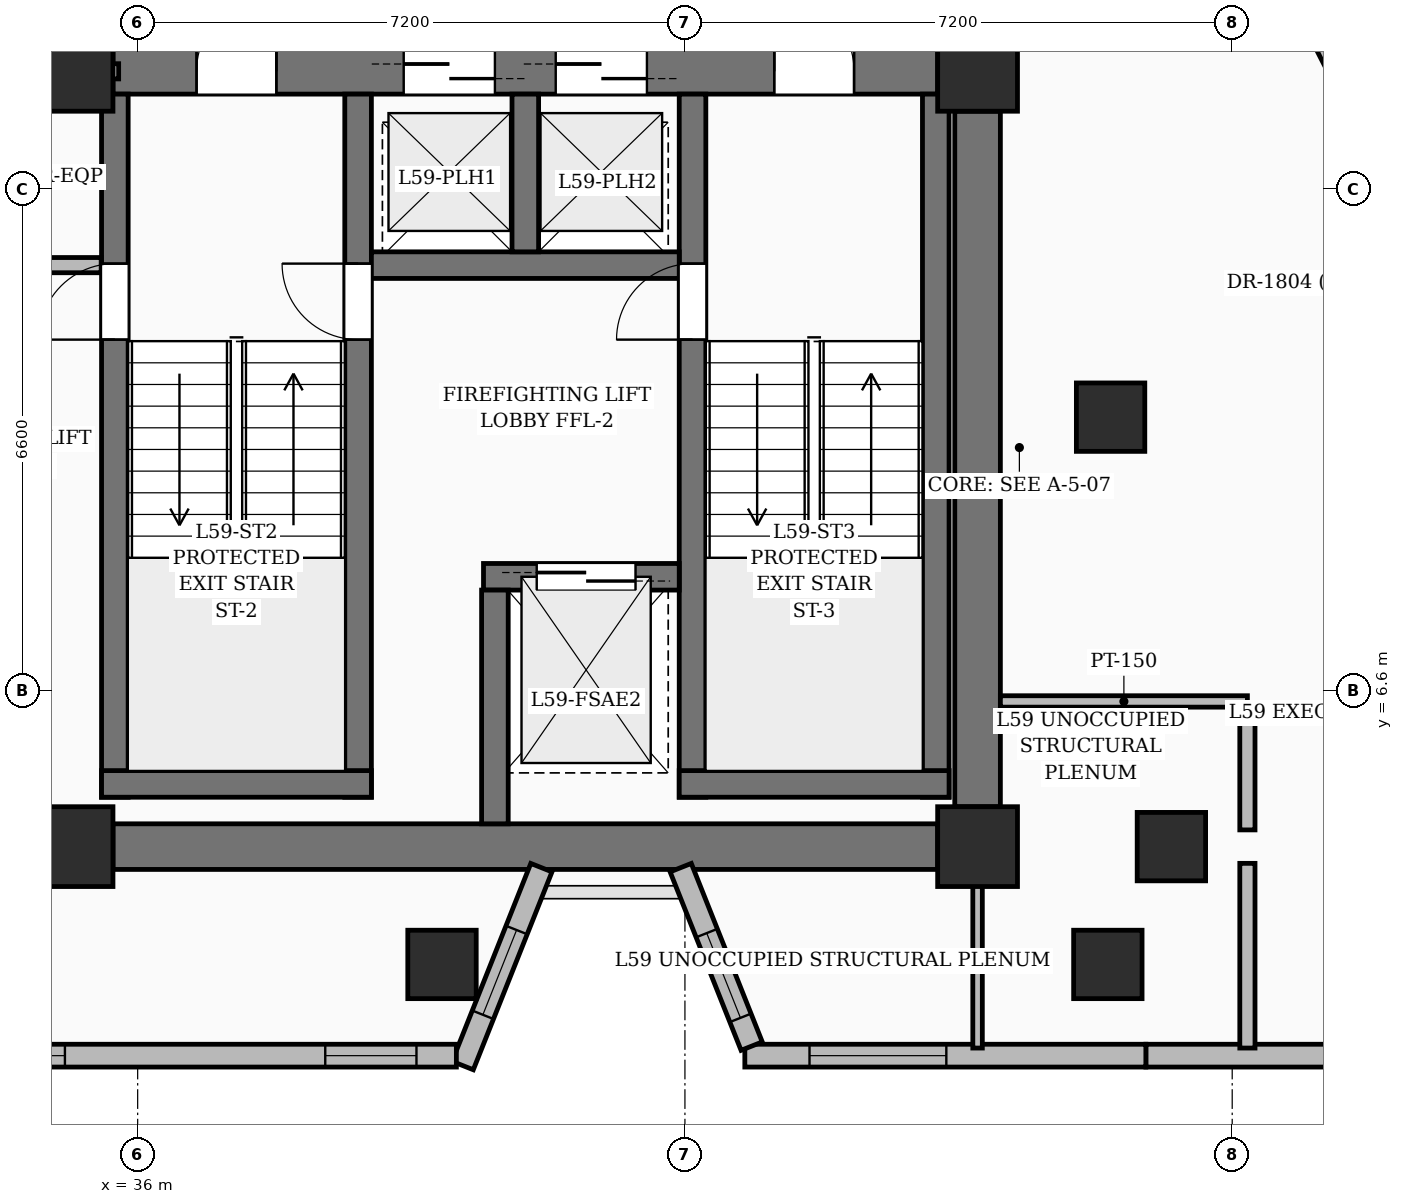
"""IFC4 building model, lengths in metres.
Left out: names, types, materials, properties, quantities, classifications, styles, units other than length and angle.
Written with IfcOpenShell. Run it as: python <this file> out.ifc"""

import sys

from ifc_helpers import new_model, si_unit, direction, frame, frame_2d, origin, origin_2d, place, context, subcontext, project, spatial, rectangle, extrude, element, fill, save


model = new_model("IFC4")
c1 = context("Model", 3, precision=1e-05, world=origin(), true_north=direction((0.0, 1.0)))
c2 = subcontext(c1, "Body", "Model", "MODEL_VIEW")
j1 = project(units=[si_unit("LENGTHUNIT", "METRE"), si_unit("PLANEANGLEUNIT", "RADIAN")], contexts=[c1])
p1 = place(None, origin())
s1 = spatial("IfcSite", under=j1, at=p1, CompositionType="ELEMENT")
p2 = place(p1, origin())
s2 = spatial("IfcBuilding", under=s1, at=p2, CompositionType="ELEMENT")
p3 = place(p2, frame((0.0, 0.0, 229.5)))
s3 = spatial("IfcBuildingStorey", under=s2, at=p3, CompositionType="ELEMENT", Elevation=229.5)
for number, where, z_axis, x_axis in (
    (1, (35.15, 4.55, 0.0), (0.0, 0.0, 1.0), (1.0, 0.0, 0.0)),
    (2, (47.05, 4.55, 0.0), (0.0, 0.0, 1.0), (1.0, 0.0, 0.0)),
    (3, (35.15, 14.75, 0.0), (0.0, 0.0, 1.0), (1.0, 0.0, 0.0)),
    (4, (47.05, 14.75, 0.0), (0.0, 0.0, 1.0), (1.0, 0.0, 0.0)),
):
    element("IfcColumn", number, at=place(p3, frame(where, z_axis=z_axis, x_axis=x_axis)), inside=s3, PredefinedType="COLUMN", context=c2, shape_type="SweptSolid", body=[
        extrude(rectangle(XDim=1.05, YDim=1.05, at=origin_2d()), origin(), (0.0, 0.0, 1.0), 3.75),
    ])
for number, where, z_axis, x_axis in (
    (5, (49.6, 4.55, 0.0), (0.0, 0.0, 1.0), (1.0, 0.0, 0.0)),
    (6, (48.8, 10.2, 0.0), (0.0, 0.0, 1.0), (1.0, 0.0, 0.0)),
):
    element("IfcColumn", number, at=place(p3, frame(where, z_axis=z_axis, x_axis=x_axis)), inside=s3, PredefinedType="COLUMN", context=c2, shape_type="SweptSolid", body=[
        extrude(rectangle(XDim=0.9, YDim=0.9, at=origin_2d()), origin(), (0.0, 0.0, 1.0), 3.75),
    ])
p4 = place(p3, frame((35.675, 4.55, 0.0), z_axis=(0.0, 0.0, 1.0), x_axis=(1.0, 0.0, 0.0)))
e7 = element("IfcWall", 7, at=p4, inside=s3, PredefinedType="SHEAR", context=c2, shape_type="SweptSolid", body=[
    extrude(rectangle(XDim=10.85, YDim=0.6, at=frame_2d((5.425, 0.0))), origin(), (0.0, 0.0, 1.0), 3.75),
])
p5 = place(p3, frame((35.675, 14.75, 0.0), z_axis=(0.0, 0.0, 1.0), x_axis=(1.0, 0.0, 0.0)))
e8 = element("IfcWall", 8, at=p5, inside=s3, PredefinedType="SHEAR", context=c2, shape_type="SweptSolid", body=[
    extrude(rectangle(XDim=10.85, YDim=0.6, at=frame_2d((5.425, 0.0))), origin(), (0.0, 0.0, 1.0), 3.75),
])
p6 = place(p5, frame((1.1, 0.0, 0.0)))
e9 = element("IfcOpeningElement", 9, at=p6, cuts=e8, PredefinedType="OPENING", context=c2, shape_type="SweptSolid", body=[
    extrude(rectangle(XDim=1.05, YDim=2.15, at=frame_2d((0.525, 1.075))), frame((0.0, 0.31, 0.0), z_axis=(0.0, -1.0, 0.0), x_axis=(1.0, 0.0, 0.0)), (0.0, 0.0, 1.0), 0.62),
])
p7 = place(p5, frame((8.7, 0.0, 0.0)))
e10 = element("IfcOpeningElement", 10, at=p7, cuts=e8, PredefinedType="OPENING", context=c2, shape_type="SweptSolid", body=[
    extrude(rectangle(XDim=1.05, YDim=2.15, at=frame_2d((0.525, 1.075))), frame((0.0, 0.31, 0.0), z_axis=(0.0, -1.0, 0.0), x_axis=(1.0, 0.0, 0.0)), (0.0, 0.0, 1.0), 0.62),
])
p8 = place(p5, frame((3.825, 0.0, 0.0)))
e11 = element("IfcOpeningElement", 11, at=p8, cuts=e8, PredefinedType="OPENING", context=c2, shape_type="SweptSolid", body=[
    extrude(rectangle(XDim=1.2, YDim=2.2, at=frame_2d((0.6, 1.1))), frame((0.0, 0.31, 0.0), z_axis=(0.0, -1.0, 0.0), x_axis=(1.0, 0.0, 0.0)), (0.0, 0.0, 1.0), 0.62),
])
p9 = place(p5, frame((5.825, 0.0, 0.0)))
e12 = element("IfcOpeningElement", 12, at=p9, cuts=e8, PredefinedType="OPENING", context=c2, shape_type="SweptSolid", body=[
    extrude(rectangle(XDim=1.2, YDim=2.2, at=frame_2d((0.6, 1.1))), frame((0.0, 0.31, 0.0), z_axis=(0.0, -1.0, 0.0), x_axis=(1.0, 0.0, 0.0)), (0.0, 0.0, 1.0), 0.62),
])
p10 = place(p3, frame((47.05, 5.075, 0.0), z_axis=(0.0, 0.0, 1.0), x_axis=(0.0, 1.0, 0.0)))
e13 = element("IfcWall", 13, at=p10, inside=s3, PredefinedType="SHEAR", context=c2, shape_type="SweptSolid", body=[
    extrude(rectangle(XDim=9.15, YDim=0.6, at=frame_2d((4.575, 0.0))), origin(), (0.0, 0.0, 1.0), 3.75),
])
p11 = place(p3, frame((35.7, 5.2, 0.0), z_axis=(0.0, 0.0, 1.0), x_axis=(0.0, 1.0, 0.0)))
e14 = element("IfcWall", 14, at=p11, inside=s3, PredefinedType="SOLIDWALL", context=c2, shape_type="SweptSolid", body=[
    extrude(rectangle(XDim=9.25, YDim=0.35, at=frame_2d((4.625, 0.0))), origin(), (0.0, 0.0, 1.0), 3.75),
])
p12 = place(p11, frame((6.02, 0.0, 0.0)))
e15 = element("IfcOpeningElement", 15, at=p12, cuts=e14, PredefinedType="OPENING", context=c2, shape_type="SweptSolid", body=[
    extrude(rectangle(XDim=1.0, YDim=2.15, at=frame_2d((0.5, 1.075))), frame((0.0, 0.185, 0.0), z_axis=(0.0, -1.0, 0.0), x_axis=(1.0, 0.0, 0.0)), (0.0, 0.0, 1.0), 0.37),
])
p13 = place(p3, frame((38.9, 5.2, 0.0), z_axis=(0.0, 0.0, 1.0), x_axis=(0.0, 1.0, 0.0)))
e16 = element("IfcWall", 16, at=p13, inside=s3, PredefinedType="SOLIDWALL", context=c2, shape_type="SweptSolid", body=[
    extrude(rectangle(XDim=9.25, YDim=0.35, at=frame_2d((4.625, 0.0))), origin(), (0.0, 0.0, 1.0), 3.75),
])
p14 = place(p13, frame((6.02, 0.0, 0.0)))
e17 = element("IfcOpeningElement", 17, at=p14, cuts=e16, PredefinedType="OPENING", context=c2, shape_type="SweptSolid", body=[
    extrude(rectangle(XDim=1.0, YDim=2.15, at=frame_2d((0.5, 1.075))), frame((0.0, 0.185, 0.0), z_axis=(0.0, -1.0, 0.0), x_axis=(1.0, 0.0, 0.0)), (0.0, 0.0, 1.0), 0.37),
])
p15 = place(p3, frame((35.525, 5.375, 0.0), z_axis=(0.0, 0.0, 1.0), x_axis=(1.0, 0.0, 0.0)))
e18 = element("IfcWall", 18, at=p15, inside=s3, PredefinedType="SOLIDWALL", context=c2, shape_type="SweptSolid", body=[
    extrude(rectangle(XDim=3.55, YDim=0.35, at=frame_2d((1.775, 0.0))), origin(), (0.0, 0.0, 1.0), 3.75),
])
p16 = place(p3, frame((43.3, 5.2, 0.0), z_axis=(0.0, 0.0, 1.0), x_axis=(0.0, 1.0, 0.0)))
e19 = element("IfcWall", 19, at=p16, inside=s3, PredefinedType="SOLIDWALL", context=c2, shape_type="SweptSolid", body=[
    extrude(rectangle(XDim=9.25, YDim=0.35, at=frame_2d((4.625, 0.0))), origin(), (0.0, 0.0, 1.0), 3.75),
])
p17 = place(p16, frame((6.02, 0.0, 0.0)))
e20 = element("IfcOpeningElement", 20, at=p17, cuts=e19, PredefinedType="OPENING", context=c2, shape_type="SweptSolid", body=[
    extrude(rectangle(XDim=1.0, YDim=2.15, at=frame_2d((0.5, 1.075))), frame((0.0, 0.185, 0.0), z_axis=(0.0, -1.0, 0.0), x_axis=(1.0, 0.0, 0.0)), (0.0, 0.0, 1.0), 0.37),
])
p18 = place(p3, frame((46.5, 5.2, 0.0), z_axis=(0.0, 0.0, 1.0), x_axis=(0.0, 1.0, 0.0)))
e21 = element("IfcWall", 21, at=p18, inside=s3, PredefinedType="SOLIDWALL", context=c2, shape_type="SweptSolid", body=[
    extrude(rectangle(XDim=9.25, YDim=0.35, at=frame_2d((4.625, 0.0))), origin(), (0.0, 0.0, 1.0), 3.75),
])
p19 = place(p3, frame((43.125, 5.375, 0.0), z_axis=(0.0, 0.0, 1.0), x_axis=(1.0, 0.0, 0.0)))
e22 = element("IfcWall", 22, at=p19, inside=s3, PredefinedType="SOLIDWALL", context=c2, shape_type="SweptSolid", body=[
    extrude(rectangle(XDim=3.55, YDim=0.35, at=frame_2d((1.775, 0.0))), origin(), (0.0, 0.0, 1.0), 3.75),
])
p20 = place(p3, frame((40.55, 8.1, 0.0), z_axis=(0.0, 0.0, 1.0), x_axis=(1.0, 0.0, 0.0)))
e23 = element("IfcWall", 23, at=p20, inside=s3, PredefinedType="SOLIDWALL", context=c2, shape_type="SweptSolid", body=[
    extrude(rectangle(XDim=2.575, YDim=0.35, at=frame_2d((1.288, 0.0))), origin(), (0.0, 0.0, 1.0), 3.75),
])
p21 = place(p20, frame((0.7, 0.0, 0.0)))
e24 = element("IfcOpeningElement", 24, at=p21, cuts=e23, PredefinedType="OPENING", context=c2, shape_type="SweptSolid", body=[
    extrude(rectangle(XDim=1.3, YDim=2.25, at=frame_2d((0.65, 1.125))), frame((0.0, 0.185, 0.0), z_axis=(0.0, -1.0, 0.0), x_axis=(1.0, 0.0, 0.0)), (0.0, 0.0, 1.0), 0.37),
])
p22 = place(p3, frame((40.7, 4.85, 0.0), z_axis=(0.0, 0.0, 1.0), x_axis=(0.0, 1.0, 0.0)))
e25 = element("IfcWall", 25, at=p22, inside=s3, PredefinedType="SOLIDWALL", context=c2, shape_type="SweptSolid", body=[
    extrude(rectangle(XDim=3.075, YDim=0.35, at=frame_2d((1.538, 0.0))), origin(), (0.0, 0.0, 1.0), 3.75),
])
p23 = place(p3, frame((39.075, 12.2, 0.0), z_axis=(0.0, 0.0, 1.0), x_axis=(1.0, 0.0, 0.0)))
e26 = element("IfcWall", 26, at=p23, inside=s3, PredefinedType="SOLIDWALL", context=c2, shape_type="SweptSolid", body=[
    extrude(rectangle(XDim=4.05, YDim=0.35, at=frame_2d((2.025, 0.0))), origin(), (0.0, 0.0, 1.0), 3.75),
])
p24 = place(p3, frame((41.1, 12.375, 0.0), z_axis=(0.0, 0.0, 1.0), x_axis=(0.0, 1.0, 0.0)))
e27 = element("IfcWall", 27, at=p24, inside=s3, PredefinedType="SOLIDWALL", context=c2, shape_type="SweptSolid", body=[
    extrude(rectangle(XDim=2.075, YDim=0.35, at=frame_2d((1.038, 0.0))), origin(), (0.0, 0.0, 1.0), 3.75),
])
for number, where, z_axis, x_axis in (
    (28, (40.004, 3.0, 0.0), (0.0, 0.0, 1.0), (1.0, 0.0, 0.0)),
    (29, (48.764, 3.0, 0.0), (0.0, 0.0, 1.0), (1.0, 0.0, 0.0)),
):
    element("IfcColumn", number, at=place(p3, frame(where, z_axis=z_axis, x_axis=x_axis)), inside=s3, PredefinedType="COLUMN", context=c2, shape_type="SweptSolid", body=[
        extrude(rectangle(XDim=0.9, YDim=0.9, at=origin_2d()), origin(), (0.0, 0.0, 1.0), 3.75),
    ])
p25 = place(p3, frame((50.331, 17.684, 0.0), z_axis=(0.0, 0.0, 1.0), x_axis=(0.452886204096, -0.891568329484, 0.0)))
e30 = element("IfcWall", 30, at=p25, inside=s3, PredefinedType="SOLIDWALL", context=c2, shape_type="SweptSolid", body=[
    extrude(rectangle(XDim=6.978, YDim=0.3, at=frame_2d((3.489, 0.0))), origin(), (0.0, 0.0, 1.0), 3.5),
])
p26 = place(p25, frame((4.681, 0.0, 0.0)))
e31 = element("IfcOpeningElement", 31, at=p26, cuts=e30, PredefinedType="OPENING", context=c2, shape_type="SweptSolid", body=[
    extrude(rectangle(XDim=1.0, YDim=2.2, at=frame_2d((0.5, 1.1))), frame((0.0, 0.16, 0.0), z_axis=(0.0, -1.0, 0.0), x_axis=(1.0, 0.0, 0.0)), (0.0, 0.0, 1.0), 0.32),
])
p27 = place(p3, frame((53.975, 1.8, 0.0), z_axis=(0.0, 0.0, 1.0), x_axis=(-1.0, 0.0, 0.0)))
e32 = element("IfcWall", 32, at=p27, inside=s3, PredefinedType="SOLIDWALL", context=c2, shape_type="SweptSolid", body=[
    extrude(rectangle(XDim=4.711, YDim=0.3, at=frame_2d((2.355, 0.0))), origin(), (0.0, 0.0, 1.0), 3.5),
])
p28 = place(p3, frame((49.264, 1.8, 0.0), z_axis=(0.0, 0.0, 1.0), x_axis=(-1.0, 0.0, 0.0)))
e33 = element("IfcWall", 33, at=p28, inside=s3, PredefinedType="SOLIDWALL", context=c2, shape_type="SweptSolid", body=[
    extrude(rectangle(XDim=5.276, YDim=0.3, at=frame_2d((2.638, 0.0))), origin(), (0.0, 0.0, 1.0), 3.5),
])
p29 = place(p28, frame((2.625, 0.0, 0.6)))
e34 = element("IfcOpeningElement", 34, at=p29, cuts=e33, PredefinedType="OPENING", context=c2, shape_type="SweptSolid", body=[
    extrude(rectangle(XDim=1.8, YDim=2.1, at=frame_2d((0.9, 1.05))), frame((0.0, 0.16, 0.0), z_axis=(0.0, -1.0, 0.0), x_axis=(1.0, 0.0, 0.0)), (0.0, 0.0, 1.0), 0.32),
])
p30 = place(p3, frame((44.078, 1.925, 0.0), z_axis=(0.0, 0.0, 1.0), x_axis=(-0.369540985735, 0.929214431583, 0.0)))
e35 = element("IfcWall", 35, at=p30, inside=s3, PredefinedType="SOLIDWALL", context=c2, shape_type="SweptSolid", body=[
    extrude(rectangle(XDim=2.527, YDim=0.3, at=frame_2d((1.264, 0.0))), origin(), (0.0, 0.0, 1.0), 2.825),
])
p31 = place(p30, frame((0.4, 0.0, 0.8)))
e36 = element("IfcOpeningElement", 36, at=p31, cuts=e35, PredefinedType="OPENING", context=c2, shape_type="SweptSolid", body=[
    extrude(rectangle(XDim=1.2, YDim=1.8, at=frame_2d((0.6, 0.9))), frame((0.0, 0.16, 0.0), z_axis=(0.0, -1.0, 0.0), x_axis=(1.0, 0.0, 0.0)), (0.0, 0.0, 1.0), 0.32),
])
p32 = place(p3, frame((41.312, 4.273, 0.0), z_axis=(0.0, 0.0, 1.0), x_axis=(-0.369466825356, -0.929243921132, 0.0)))
e37 = element("IfcWall", 37, at=p32, inside=s3, PredefinedType="SOLIDWALL", context=c2, shape_type="SweptSolid", body=[
    extrude(rectangle(XDim=2.802, YDim=0.3, at=frame_2d((1.401, 0.0))), origin(), (0.0, 0.0, 1.0), 2.825),
])
p33 = place(p32, frame((0.883, 0.0, 0.8)))
e38 = element("IfcOpeningElement", 38, at=p33, cuts=e37, PredefinedType="OPENING", context=c2, shape_type="SweptSolid", body=[
    extrude(rectangle(XDim=1.2, YDim=1.8, at=frame_2d((0.6, 0.9))), frame((0.0, 0.16, 0.0), z_axis=(0.0, -1.0, 0.0), x_axis=(1.0, 0.0, 0.0)), (0.0, 0.0, 1.0), 0.32),
])
p34 = place(p3, frame((40.193, 1.8, 0.0), z_axis=(0.0, 0.0, 1.0), x_axis=(-1.0, 0.0, 0.0)))
e39 = element("IfcWall", 39, at=p34, inside=s3, PredefinedType="SOLIDWALL", context=c2, shape_type="SweptSolid", body=[
    extrude(rectangle(XDim=7.061, YDim=0.3, at=frame_2d((3.531, 0.0))), origin(), (0.0, 0.0, 1.0), 3.5),
])
p35 = place(p34, frame((5.15, 0.0, 0.8)))
e40 = element("IfcOpeningElement", 40, at=p35, cuts=e39, PredefinedType="OPENING", context=c2, shape_type="SweptSolid", body=[
    extrude(rectangle(XDim=1.2, YDim=1.8, at=frame_2d((0.6, 0.9))), frame((0.0, 0.16, 0.0), z_axis=(0.0, -1.0, 0.0), x_axis=(1.0, 0.0, 0.0)), (0.0, 0.0, 1.0), 0.32),
])
p36 = place(p34, frame((0.525, 0.0, 0.8)))
e41 = element("IfcOpeningElement", 41, at=p36, cuts=e39, PredefinedType="OPENING", context=c2, shape_type="SweptSolid", body=[
    extrude(rectangle(XDim=1.2, YDim=1.8, at=frame_2d((0.6, 0.9))), frame((0.0, 0.16, 0.0), z_axis=(0.0, -1.0, 0.0), x_axis=(1.0, 0.0, 0.0)), (0.0, 0.0, 1.0), 0.32),
])
p37 = place(p3, frame((34.72, 14.75, 0.0), z_axis=(0.0, 0.0, 1.0), x_axis=(1.0, 0.0, 0.0)))
e42 = element("IfcWall", 42, at=p37, inside=s3, PredefinedType="PARTITIONING", context=c2, shape_type="SweptSolid", body=[
    extrude(rectangle(XDim=1.03, YDim=0.2, at=frame_2d((0.515, 0.0))), origin(), (0.0, 0.0, 1.0), 2.685),
])
p38 = place(p3, frame((31.48, 12.2, 0.0), z_axis=(0.0, 0.0, 1.0), x_axis=(1.0, 0.0, 0.0)))
e43 = element("IfcWall", 43, at=p38, inside=s3, PredefinedType="PARTITIONING", context=c2, shape_type="SweptSolid", body=[
    extrude(rectangle(XDim=4.04, YDim=0.2, at=frame_2d((2.02, 0.0))), origin(), (0.0, 0.0, 1.0), 3.5),
])
p39 = place(p38, frame((1.545, 0.0, 0.0)))
e44 = element("IfcOpeningElement", 44, at=p39, cuts=e43, PredefinedType="OPENING", context=c2, shape_type="SweptSolid", body=[
    extrude(rectangle(XDim=0.95, YDim=2.15, at=frame_2d((0.475, 1.075))), frame((0.0, 0.11, 0.0), z_axis=(0.0, -1.0, 0.0), x_axis=(1.0, 0.0, 0.0)), (0.0, 0.0, 1.0), 0.22),
])
p40 = place(p3, frame((47.05, 4.25, 0.0), z_axis=(0.0, 0.0, 1.0), x_axis=(0.0, -1.0, 0.0)))
e45 = element("IfcWall", 45, at=p40, inside=s3, PredefinedType="PARTITIONING", context=c2, shape_type="SweptSolid", body=[
    extrude(rectangle(XDim=2.35, YDim=0.125, at=frame_2d((1.175, 0.0))), origin(), (0.0, 0.0, 1.0), 2.82),
])
p41 = place(p3, frame((50.6, 6.46, 0.0), z_axis=(0.0, 0.0, 1.0), x_axis=(-1.0, 0.0, 0.0)))
e46 = element("IfcWall", 46, at=p41, inside=s3, PredefinedType="PARTITIONING", context=c2, shape_type="SweptSolid", body=[
    extrude(rectangle(XDim=3.25, YDim=0.15, at=frame_2d((1.625, 0.0))), origin(), (0.0, 0.0, 1.0), 2.685),
])
p42 = place(p3, frame((50.6, 1.9, 0.0), z_axis=(0.0, 0.0, 1.0), x_axis=(0.0, 1.0, 0.0)))
e47 = element("IfcWall", 47, at=p42, inside=s3, PredefinedType="PARTITIONING", context=c2, shape_type="SweptSolid", body=[
    extrude(rectangle(XDim=2.43, YDim=0.2, at=frame_2d((1.215, 0.0))), origin(), (0.0, 0.0, 1.0), 3.5),
])
p43 = place(p3, frame((50.6, 4.77, 0.0), z_axis=(0.0, 0.0, 1.0), x_axis=(0.0, 1.0, 0.0)))
e48 = element("IfcWall", 48, at=p43, inside=s3, PredefinedType="PARTITIONING", context=c2, shape_type="SweptSolid", body=[
    extrude(rectangle(XDim=1.63, YDim=0.2, at=frame_2d((0.815, 0.0))), origin(), (0.0, 0.0, 1.0), 2.82),
])
p44 = place(p29, origin())
e49 = element("IfcWindow", 49, at=p44, inside=s3, PartitioningType="SINGLE_PANEL", PredefinedType="WINDOW", context=c2, shape_type="SweptSolid", body=[
    extrude(rectangle(XDim=1.8, YDim=2.1, at=frame_2d((0.9, 1.05))), frame((0.0, 0.03, 0.0), z_axis=(0.0, -1.0, 0.0), x_axis=(1.0, 0.0, 0.0)), (0.0, 0.0, 1.0), 0.06),
])
fill(e34, e49)
p45 = place(p31, origin())
e50 = element("IfcWindow", 50, at=p45, inside=s3, PartitioningType="SINGLE_PANEL", PredefinedType="WINDOW", context=c2, shape_type="SweptSolid", body=[
    extrude(rectangle(XDim=1.2, YDim=1.8, at=frame_2d((0.6, 0.9))), frame((0.0, 0.03, 0.0), z_axis=(0.0, -1.0, 0.0), x_axis=(1.0, 0.0, 0.0)), (0.0, 0.0, 1.0), 0.06),
])
fill(e36, e50)
p46 = place(p33, origin())
e51 = element("IfcWindow", 51, at=p46, inside=s3, PartitioningType="SINGLE_PANEL", PredefinedType="WINDOW", context=c2, shape_type="SweptSolid", body=[
    extrude(rectangle(XDim=1.2, YDim=1.8, at=frame_2d((0.6, 0.9))), frame((0.0, 0.03, 0.0), z_axis=(0.0, -1.0, 0.0), x_axis=(1.0, 0.0, 0.0)), (0.0, 0.0, 1.0), 0.06),
])
fill(e38, e51)
p47 = place(p35, origin())
e52 = element("IfcWindow", 52, at=p47, inside=s3, PartitioningType="SINGLE_PANEL", PredefinedType="WINDOW", context=c2, shape_type="SweptSolid", body=[
    extrude(rectangle(XDim=1.2, YDim=1.8, at=frame_2d((0.6, 0.9))), frame((0.0, 0.03, 0.0), z_axis=(0.0, -1.0, 0.0), x_axis=(1.0, 0.0, 0.0)), (0.0, 0.0, 1.0), 0.06),
])
fill(e40, e52)
p48 = place(p36, origin())
e53 = element("IfcWindow", 53, at=p48, inside=s3, PartitioningType="SINGLE_PANEL", PredefinedType="WINDOW", context=c2, shape_type="SweptSolid", body=[
    extrude(rectangle(XDim=1.2, YDim=1.8, at=frame_2d((0.6, 0.9))), frame((0.0, 0.03, 0.0), z_axis=(0.0, -1.0, 0.0), x_axis=(1.0, 0.0, 0.0)), (0.0, 0.0, 1.0), 0.06),
])
fill(e41, e53)
p49 = place(p6, origin())
e54 = element("IfcDoor", 54, at=p49, inside=s3, OperationType="SINGLE_SWING_RIGHT", PredefinedType="DOOR", context=c2, shape_type="SweptSolid", body=[
    extrude(rectangle(XDim=1.05, YDim=2.15, at=frame_2d((0.525, 1.075))), frame((0.0, 0.025, 0.0), z_axis=(0.0, -1.0, 0.0), x_axis=(1.0, 0.0, 0.0)), (0.0, 0.0, 1.0), 0.05),
])
fill(e9, e54)
p50 = place(p7, origin())
e55 = element("IfcDoor", 55, at=p50, inside=s3, OperationType="SINGLE_SWING_LEFT", PredefinedType="DOOR", context=c2, shape_type="SweptSolid", body=[
    extrude(rectangle(XDim=1.05, YDim=2.15, at=frame_2d((0.525, 1.075))), frame((0.0, 0.025, 0.0), z_axis=(0.0, -1.0, 0.0), x_axis=(1.0, 0.0, 0.0)), (0.0, 0.0, 1.0), 0.05),
])
fill(e10, e55)
p51 = place(p12, origin())
e56 = element("IfcDoor", 56, at=p51, inside=s3, OperationType="SINGLE_SWING_LEFT", PredefinedType="DOOR", context=c2, shape_type="SweptSolid", body=[
    extrude(rectangle(XDim=1.0, YDim=2.15, at=frame_2d((0.5, 1.075))), frame((0.0, 0.025, 0.0), z_axis=(0.0, -1.0, 0.0), x_axis=(1.0, 0.0, 0.0)), (0.0, 0.0, 1.0), 0.05),
])
fill(e15, e56)
p52 = place(p14, origin())
e57 = element("IfcDoor", 57, at=p52, inside=s3, OperationType="SINGLE_SWING_RIGHT", PredefinedType="DOOR", context=c2, shape_type="SweptSolid", body=[
    extrude(rectangle(XDim=1.0, YDim=2.15, at=frame_2d((0.5, 1.075))), frame((0.0, 0.025, 0.0), z_axis=(0.0, -1.0, 0.0), x_axis=(1.0, 0.0, 0.0)), (0.0, 0.0, 1.0), 0.05),
])
fill(e17, e57)
p53 = place(p17, origin())
e58 = element("IfcDoor", 58, at=p53, inside=s3, OperationType="SINGLE_SWING_LEFT", PredefinedType="DOOR", context=c2, shape_type="SweptSolid", body=[
    extrude(rectangle(XDim=1.0, YDim=2.15, at=frame_2d((0.5, 1.075))), frame((0.0, 0.025, 0.0), z_axis=(0.0, -1.0, 0.0), x_axis=(1.0, 0.0, 0.0)), (0.0, 0.0, 1.0), 0.05),
])
fill(e20, e58)
p54 = place(p21, origin())
e59 = element("IfcDoor", 59, at=p54, inside=s3, OperationType="DOUBLE_DOOR_SLIDING", PredefinedType="DOOR", context=c2, shape_type="SweptSolid", body=[
    extrude(rectangle(XDim=1.3, YDim=2.25, at=frame_2d((0.65, 1.125))), frame((0.0, 0.025, 0.0), z_axis=(0.0, -1.0, 0.0), x_axis=(1.0, 0.0, 0.0)), (0.0, 0.0, 1.0), 0.05),
])
fill(e24, e59)
p55 = place(p8, origin())
e60 = element("IfcDoor", 60, at=p55, inside=s3, OperationType="DOUBLE_DOOR_SLIDING", PredefinedType="DOOR", context=c2, shape_type="SweptSolid", body=[
    extrude(rectangle(XDim=1.2, YDim=2.2, at=frame_2d((0.6, 1.1))), frame((0.0, 0.025, 0.0), z_axis=(0.0, -1.0, 0.0), x_axis=(1.0, 0.0, 0.0)), (0.0, 0.0, 1.0), 0.05),
])
fill(e11, e60)
p56 = place(p9, origin())
e61 = element("IfcDoor", 61, at=p56, inside=s3, OperationType="DOUBLE_DOOR_SLIDING", PredefinedType="DOOR", context=c2, shape_type="SweptSolid", body=[
    extrude(rectangle(XDim=1.2, YDim=2.2, at=frame_2d((0.6, 1.1))), frame((0.0, 0.025, 0.0), z_axis=(0.0, -1.0, 0.0), x_axis=(1.0, 0.0, 0.0)), (0.0, 0.0, 1.0), 0.05),
])
fill(e12, e61)
save(model, sys.argv[1])
